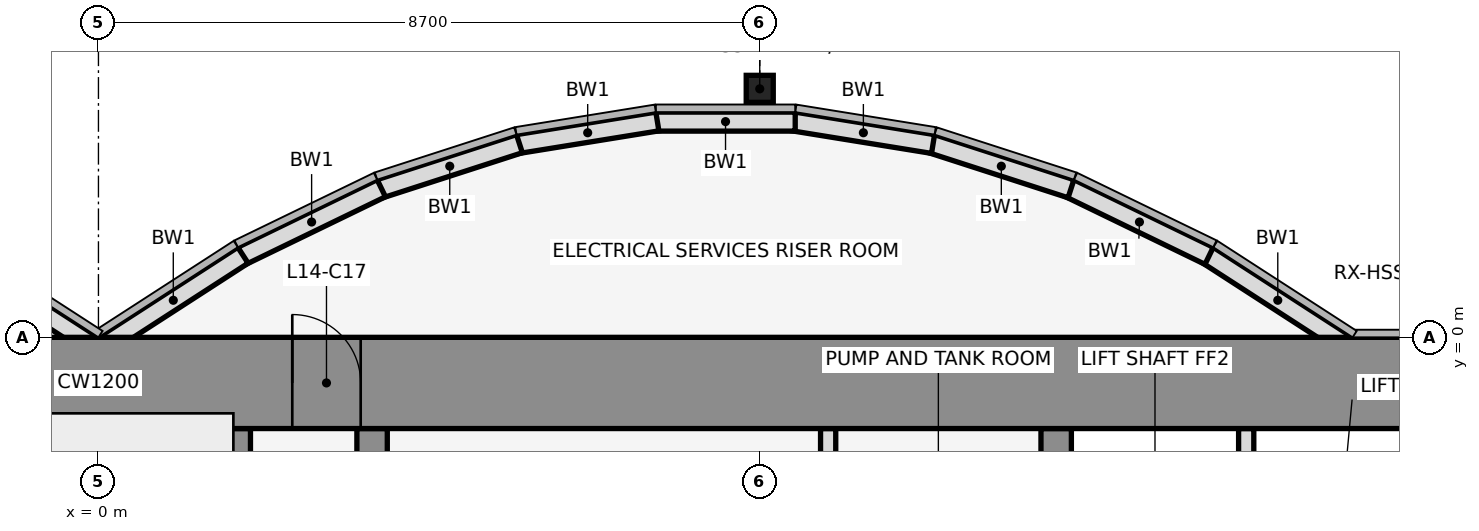
"""IFC4 building model, lengths in metres.
Left out: names, types, materials, properties, quantities, classifications, styles, units other than length and angle.
Written with IfcOpenShell. Run it as: python <this file> out.ifc"""

import sys

from ifc_helpers import new_model, si_unit, direction, frame, frame_2d, origin, origin_2d, place, context, subcontext, project, spatial, rectangle, hollow_rectangle, extrude, element, fill, save


model = new_model("IFC4")
c1 = context("Model", 3, precision=1e-05, world=origin(), true_north=direction((0.0, 1.0)))
c2 = subcontext(c1, "Body", "Model", "MODEL_VIEW")
j1 = project(units=[si_unit("LENGTHUNIT", "METRE"), si_unit("PLANEANGLEUNIT", "RADIAN")], contexts=[c1])
p1 = place(None, origin())
s1 = spatial("IfcSite", under=j1, at=p1, CompositionType="ELEMENT")
p2 = place(p1, origin())
s2 = spatial("IfcBuilding", under=s1, at=p2, CompositionType="ELEMENT")
p3 = place(p2, frame((0.0, 0.0, 71.0)))
s3 = spatial("IfcBuildingStorey", under=s2, at=p3, CompositionType="ELEMENT", Elevation=71.0)
p4 = place(p3, frame((8.7, 3.269, 0.0), z_axis=(0.0, 0.0, 1.0), x_axis=(1.0, 0.0, 0.0)))
e1 = element("IfcColumn", 1, at=p4, inside=s3, PredefinedType="COLUMN", context=c2, shape_type="SweptSolid", body=[
    extrude(hollow_rectangle(XDim=0.356, YDim=0.356, WallThickness=0.012, at=origin_2d()), origin(), (0.0, 0.0, 1.0), 4.5),
])
p5 = place(p3, frame((16.432, -0.105, 0.0), z_axis=(0.0, 0.0, 1.0), x_axis=(-0.83981312244, 0.542875602121, 0.0)))
e2 = element("IfcWall", 2, at=p5, inside=s3, PredefinedType="STANDARD", context=c2, shape_type="SweptSolid", body=[
    extrude(rectangle(XDim=2.183, YDim=0.25, at=frame_2d((1.091, 0.0))), origin(), (0.0, 0.0, 1.0), 4.35),
])
p6 = place(p3, frame((14.612, 1.073, 0.0), z_axis=(0.0, 0.0, 1.0), x_axis=(-0.89982408427, 0.436252928206, 0.0)))
e3 = element("IfcWall", 3, at=p6, inside=s3, PredefinedType="STANDARD", context=c2, shape_type="SweptSolid", body=[
    extrude(rectangle(XDim=2.038, YDim=0.25, at=frame_2d((1.019, 0.0))), origin(), (0.0, 0.0, 1.0), 4.35),
])
p7 = place(p3, frame((12.795, 1.955, 0.0), z_axis=(0.0, 0.0, 1.0), x_axis=(-0.951495806175, 0.307661714928, 0.0)))
e4 = element("IfcWall", 4, at=p7, inside=s3, PredefinedType="STANDARD", context=c2, shape_type="SweptSolid", body=[
    extrude(rectangle(XDim=1.927, YDim=0.25, at=frame_2d((0.963, 0.0))), origin(), (0.0, 0.0, 1.0), 4.35),
])
p8 = place(p3, frame((10.98, 2.543, 0.0), z_axis=(0.0, 0.0, 1.0), x_axis=(-0.987181718931, 0.159600293885, 0.0)))
e5 = element("IfcWall", 5, at=p8, inside=s3, PredefinedType="STANDARD", context=c2, shape_type="SweptSolid", body=[
    extrude(rectangle(XDim=1.857, YDim=0.25, at=frame_2d((0.929, 0.0))), origin(), (0.0, 0.0, 1.0), 4.35),
])
p9 = place(p3, frame((9.167, 2.838, 0.0), z_axis=(0.0, 0.0, 1.0), x_axis=(-1.0, 0.0, 0.0)))
e6 = element("IfcWall", 6, at=p9, inside=s3, PredefinedType="STANDARD", context=c2, shape_type="SweptSolid", body=[
    extrude(rectangle(XDim=1.833, YDim=0.25, at=frame_2d((0.917, 0.0))), origin(), (0.0, 0.0, 1.0), 4.35),
])
p10 = place(p3, frame((7.353, 2.84, 0.0), z_axis=(0.0, 0.0, 1.0), x_axis=(-0.987181718931, -0.159600293885, 0.0)))
e7 = element("IfcWall", 7, at=p10, inside=s3, PredefinedType="STANDARD", context=c2, shape_type="SweptSolid", body=[
    extrude(rectangle(XDim=1.857, YDim=0.25, at=frame_2d((0.929, 0.0))), origin(), (0.0, 0.0, 1.0), 4.35),
])
p11 = place(p3, frame((5.538, 2.548, 0.0), z_axis=(0.0, 0.0, 1.0), x_axis=(-0.951495806175, -0.307661714928, 0.0)))
e8 = element("IfcWall", 8, at=p11, inside=s3, PredefinedType="STANDARD", context=c2, shape_type="SweptSolid", body=[
    extrude(rectangle(XDim=1.927, YDim=0.25, at=frame_2d((0.963, 0.0))), origin(), (0.0, 0.0, 1.0), 4.35),
])
p12 = place(p3, frame((3.721, 1.962, 0.0), z_axis=(0.0, 0.0, 1.0), x_axis=(-0.89982408427, -0.436252928206, 0.0)))
e9 = element("IfcWall", 9, at=p12, inside=s3, PredefinedType="STANDARD", context=c2, shape_type="SweptSolid", body=[
    extrude(rectangle(XDim=2.038, YDim=0.25, at=frame_2d((1.019, 0.0))), origin(), (0.0, 0.0, 1.0), 4.35),
])
for number, where, z_axis, x_axis in (
    (10, (1.901, 1.08, 0.0), (0.0, 0.0, 1.0), (-0.84, -0.543, 0.0)),
    (11, (-0.068, -0.105, 0.0), (0.0, 0.0, 1.0), (-0.84, 0.543, 0.0)),
):
    element("IfcWall", number, at=place(p3, frame(where, z_axis=z_axis, x_axis=x_axis)), inside=s3, PredefinedType="STANDARD", context=c2, shape_type="SweptSolid", body=[
        extrude(rectangle(XDim=2.183, YDim=0.25, at=frame_2d((1.091, 0.0))), origin(), (0.0, 0.0, 1.0), 4.35),
    ])
p13 = place(p3, frame((1.8, -11.8, 0.0), z_axis=(0.0, 0.0, 1.0), x_axis=(0.0, 1.0, 0.0)))
e12 = element("IfcWall", 12, at=p13, inside=s3, PredefinedType="SHEAR", context=c2, shape_type="SweptSolid", body=[
    extrude(rectangle(XDim=10.6, YDim=0.4, at=frame_2d((5.3, 0.0))), origin(), (0.0, 0.0, 1.0), 4.5),
])
p14 = place(p3, frame((3.6, -11.8, 0.0), z_axis=(0.0, 0.0, 1.0), x_axis=(0.0, 1.0, 0.0)))
e13 = element("IfcWall", 13, at=p14, inside=s3, PredefinedType="SHEAR", context=c2, shape_type="SweptSolid", body=[
    extrude(rectangle(XDim=10.6, YDim=0.4, at=frame_2d((5.3, 0.0))), origin(), (0.0, 0.0, 1.0), 4.5),
])
p15 = place(p14, frame((1.35, 0.0, 0.0)))
e14 = element("IfcOpeningElement", 14, at=p15, cuts=e13, PredefinedType="OPENING", context=c2, shape_type="SweptSolid", body=[
    extrude(rectangle(XDim=0.9, YDim=2.1, at=frame_2d((0.45, 1.05))), frame((0.0, 0.212, 0.0), z_axis=(0.0, -1.0, 0.0), x_axis=(1.0, 0.0, 0.0)), (0.0, 0.0, 1.0), 0.424),
])
p16 = place(p3, frame((9.6, -4.6, 0.0), z_axis=(0.0, 0.0, 1.0), x_axis=(0.0, 1.0, 0.0)))
e15 = element("IfcWall", 15, at=p16, inside=s3, PredefinedType="PARTITIONING", context=c2, shape_type="SweptSolid", body=[
    extrude(rectangle(XDim=3.4, YDim=0.2, at=frame_2d((1.7, 0.0))), origin(), (0.0, 0.0, 1.0), 3.418),
])
p17 = place(p3, frame((12.6, -11.8, 0.0), z_axis=(0.0, 0.0, 1.0), x_axis=(0.0, 1.0, 0.0)))
e16 = element("IfcWall", 16, at=p17, inside=s3, PredefinedType="SHEAR", context=c2, shape_type="SweptSolid", body=[
    extrude(rectangle(XDim=10.6, YDim=0.4, at=frame_2d((5.3, 0.0))), origin(), (0.0, 0.0, 1.0), 4.5),
])
p18 = place(p17, frame((4.75, 0.0, 0.0)))
e17 = element("IfcOpeningElement", 17, at=p18, cuts=e16, PredefinedType="OPENING", context=c2, shape_type="SweptSolid", body=[
    extrude(rectangle(XDim=1.1, YDim=2.1, at=frame_2d((0.55, 1.05))), frame((0.0, 0.212, 0.0), z_axis=(0.0, -1.0, 0.0), x_axis=(1.0, 0.0, 0.0)), (0.0, 0.0, 1.0), 0.424),
])
p19 = place(p3, frame((15.1, -4.6, 0.0), z_axis=(0.0, 0.0, 1.0), x_axis=(0.0, 1.0, 0.0)))
e18 = element("IfcWall", 18, at=p19, inside=s3, PredefinedType="PARTITIONING", context=c2, shape_type="SweptSolid", body=[
    extrude(rectangle(XDim=3.4, YDim=0.2, at=frame_2d((1.7, 0.0))), origin(), (0.0, 0.0, 1.0), 3.418),
])
p20 = place(p3, frame((-22.0, -0.6, 0.0), z_axis=(0.0, 0.0, 1.0), x_axis=(1.0, 0.0, 0.0)))
e19 = element("IfcWall", 19, at=p20, inside=s3, PredefinedType="SHEAR", context=c2, shape_type="SweptSolid", body=[
    extrude(rectangle(XDim=44.0, YDim=1.2, at=frame_2d((22.0, 0.0))), origin(), (0.0, 0.0, 1.0), 4.5),
])
p21 = place(p20, frame((18.55, 0.0, 0.0)))
e20 = element("IfcOpeningElement", 20, at=p21, cuts=e19, PredefinedType="OPENING", context=c2, shape_type="SweptSolid", body=[
    extrude(rectangle(XDim=0.9, YDim=2.1, at=frame_2d((0.45, 1.05))), frame((0.0, 0.612, 0.0), z_axis=(0.0, -1.0, 0.0), x_axis=(1.0, 0.0, 0.0)), (0.0, 0.0, 1.0), 1.224),
])
p22 = place(p20, frame((24.55, 0.0, 0.0)))
e21 = element("IfcOpeningElement", 21, at=p22, cuts=e19, PredefinedType="OPENING", context=c2, shape_type="SweptSolid", body=[
    extrude(rectangle(XDim=0.9, YDim=2.1, at=frame_2d((0.45, 1.05))), frame((0.0, 0.612, 0.0), z_axis=(0.0, -1.0, 0.0), x_axis=(1.0, 0.0, 0.0)), (0.0, 0.0, 1.0), 1.224),
])
p23 = place(p22, origin())
e22 = element("IfcDoor", 22, at=p23, inside=s3, OperationType="SINGLE_SWING_LEFT", PredefinedType="DOOR", context=c2, shape_type="SweptSolid", body=[
    extrude(rectangle(XDim=0.9, YDim=2.1, at=frame_2d((0.45, 1.05))), frame((0.0, 0.025, 0.0), z_axis=(0.0, -1.0, 0.0), x_axis=(1.0, 0.0, 0.0)), (0.0, 0.0, 1.0), 0.05),
])
fill(e21, e22)
save(model, sys.argv[1])
